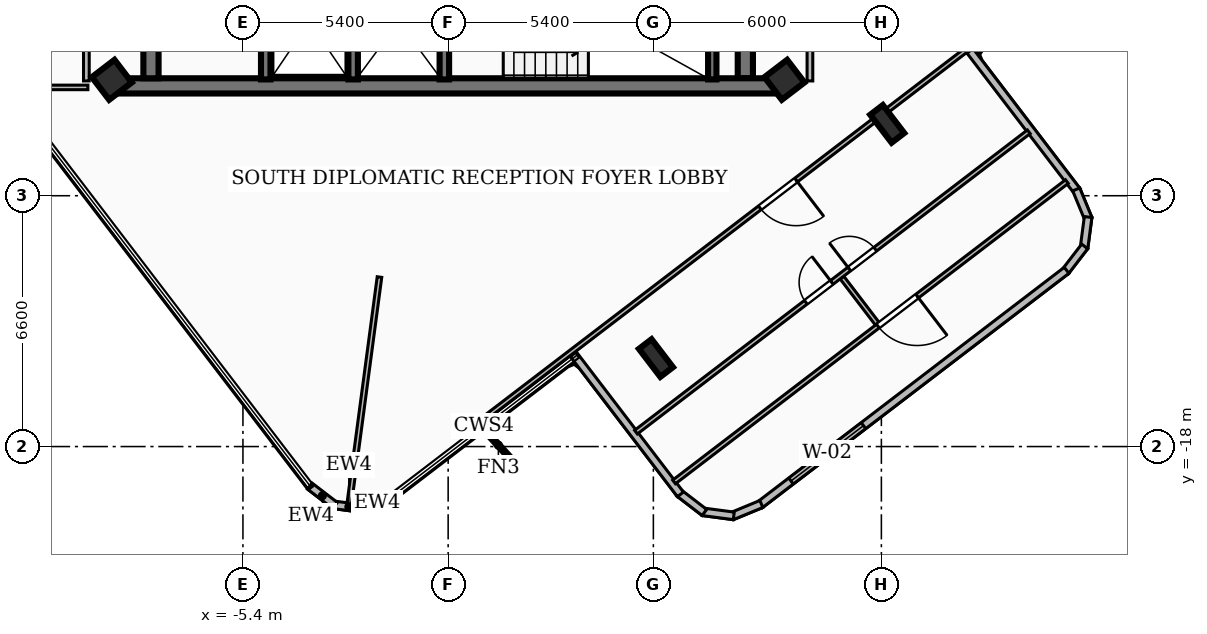
"""IFC4 building model, lengths in metres.
Left out: names, types, materials, properties, quantities, classifications, styles, units other than length and angle.
Written with IfcOpenShell. Run it as: python <this file> out.ifc"""

import sys

from ifc_helpers import new_model, si_unit, direction, frame, frame_2d, origin, origin_2d, place, context, subcontext, project, spatial, rectangle, i_section, extrude, element, fill, save


model = new_model("IFC4")
c1 = context("Model", 3, precision=1e-05, world=origin(), true_north=direction((0.0, 1.0)))
c2 = subcontext(c1, "Body", "Model", "MODEL_VIEW")
j1 = project(units=[si_unit("LENGTHUNIT", "METRE"), si_unit("PLANEANGLEUNIT", "RADIAN")], contexts=[c1])
p1 = place(None, origin())
s1 = spatial("IfcSite", under=j1, at=p1, CompositionType="ELEMENT")
p2 = place(p1, origin())
s2 = spatial("IfcBuilding", under=s1, at=p2, CompositionType="ELEMENT")
p3 = place(p2, frame((0.0, 0.0, 229.14)))
s3 = spatial("IfcBuildingStorey", under=s2, at=p3, CompositionType="ELEMENT", Elevation=229.14)
p4 = place(p3, frame((8.78, -8.51, 0.0), z_axis=(0.0, 0.0, 1.0), x_axis=(-1.0, 0.0, 0.0)))
e1 = element("IfcWall", 1, at=p4, inside=s3, PredefinedType="SHEAR", context=c2, shape_type="SweptSolid", body=[
    extrude(rectangle(XDim=17.56, YDim=0.4, at=frame_2d((8.78, 0.0))), origin(), (0.0, 0.0, 1.0), 3.14),
])
for number, where, z_axis, x_axis in (
    (2, (-7.82, -8.31, 0.0), (0.0, 0.0, 1.0), (0.0, 1.0, 0.0)),
    (3, (7.82, -1.95, 0.0), (0.0, 0.0, 1.0), (0.0, -1.0, 0.0)),
):
    element("IfcWall", number, at=place(p3, frame(where, z_axis=z_axis, x_axis=x_axis)), inside=s3, PredefinedType="SHEAR", context=c2, shape_type="SweptSolid", body=[
        extrude(rectangle(XDim=6.36, YDim=0.4, at=frame_2d((3.18, 0.0))), origin(), (0.0, 0.0, 1.0), 3.14),
    ])
p5 = place(p3, frame((6.95, -8.34, 0.0), z_axis=(0.0, 0.0, 1.0), x_axis=(0.0, 1.0, 0.0)))
e4 = element("IfcWall", 4, at=p5, inside=s3, PredefinedType="SOLIDWALL", context=c2, shape_type="SweptSolid", body=[
    extrude(rectangle(XDim=3.06, YDim=0.22, at=frame_2d((1.53, 0.0))), origin(), (0.0, 0.0, 1.0), 3.14),
])
for number, where, z_axis, x_axis in (
    (5, (-0.1, -8.34, 0.0), (0.0, 0.0, 1.0), (0.0, 1.0, 0.0)),
    (6, (-2.5, -8.34, 0.0), (0.0, 0.0, 1.0), (0.0, 1.0, 0.0)),
    (7, (-4.8, -8.34, 0.0), (0.0, 0.0, 1.0), (0.0, 1.0, 0.0)),
):
    element("IfcWall", number, at=place(p3, frame(where, z_axis=z_axis, x_axis=x_axis)), inside=s3, PredefinedType="SOLIDWALL", context=c2, shape_type="SweptSolid", body=[
        extrude(rectangle(XDim=3.04, YDim=0.25, at=frame_2d((1.52, 0.0))), origin(), (0.0, 0.0, 1.0), 3.14),
    ])
for number, where, z_axis, x_axis in (
    (8, (8.85, -8.35, 0.0), (0.0, 0.0, 1.0), (0.794, 0.607, 0.0)),
    (9, (-8.85, -8.35, 0.0), (0.0, 0.0, 1.0), (0.794, 0.607, 0.0)),
):
    element("IfcColumn", number, at=place(p3, frame(where, z_axis=z_axis, x_axis=x_axis)), inside=s3, PredefinedType="COLUMN", context=c2, shape_type="SweptSolid", body=[
        extrude(rectangle(XDim=0.75, YDim=0.75, at=origin_2d()), origin(), (0.0, 0.0, 1.0), 3.42),
    ])
for number, where, z_axis, x_axis in (
    (10, (5.468, -15.671, 0.0), (0.0, 0.0, 1.0), (0.794, 0.607, 0.0)),
    (11, (11.554, -9.51, 0.0), (0.0, 0.0, 1.0), (0.794, 0.607, 0.0)),
):
    element("IfcColumn", number, at=place(p3, frame(where, z_axis=z_axis, x_axis=x_axis)), inside=s3, PredefinedType="COLUMN", context=c2, shape_type="SweptSolid", body=[
        extrude(i_section(OverallWidth=0.418, OverallDepth=0.927, WebThickness=0.019, FlangeThickness=0.032, at=origin_2d()), origin(), (0.0, 0.0, 1.0), 3.42),
    ])
p6 = place(p3, frame((-1.478, -19.327, 0.0), z_axis=(0.0, 0.0, 1.0), x_axis=(-0.924091394431, -0.382171551451, 0.0)))
e12 = element("IfcWall", 12, at=p6, inside=s3, PredefinedType="SOLIDWALL", context=c2, shape_type="SweptSolid", body=[
    extrude(rectangle(XDim=0.837, YDim=0.2, at=frame_2d((0.419, 0.0))), origin(), (0.0, 0.0, 1.0), 3.14),
])
p7 = place(p3, frame((-2.204, -19.64, 0.0), z_axis=(0.0, 0.0, 1.0), x_axis=(-0.99140789753, 0.130806653943, 0.0)))
e13 = element("IfcWall", 13, at=p7, inside=s3, PredefinedType="SOLIDWALL", context=c2, shape_type="SweptSolid", body=[
    extrude(rectangle(XDim=0.825, YDim=0.2, at=frame_2d((0.413, 0.0))), origin(), (0.0, 0.0, 1.0), 3.14),
])
p8 = place(p3, frame((-2.977, -19.55, 0.0), z_axis=(0.0, 0.0, 1.0), x_axis=(-0.792959338773, 0.609274558022, 0.0)))
e14 = element("IfcWall", 14, at=p8, inside=s3, PredefinedType="SOLIDWALL", context=c2, shape_type="SweptSolid", body=[
    extrude(rectangle(XDim=0.839, YDim=0.2, at=frame_2d((0.419, 0.0))), origin(), (0.0, 0.0, 1.0), 3.14),
])
p9 = place(p3, frame((19.074, -3.607, 0.0), z_axis=(0.0, 0.0, 1.0), x_axis=(-0.794465731546, -0.607308983466, 0.0)))
e15 = element("IfcWall", 15, at=p9, inside=s3, PredefinedType="SOLIDWALL", context=c2, shape_type="SweptSolid", body=[
    extrude(rectangle(XDim=6.743, YDim=0.2, at=frame_2d((3.372, 0.0))), origin(), (0.0, 0.0, 1.0), 3.14),
])
p10 = place(p3, frame((13.732, -7.589, 0.0), z_axis=(0.0, 0.0, 1.0), x_axis=(0.607428636372, -0.794374251669, 0.0)))
e16 = element("IfcWall", 16, at=p10, inside=s3, PredefinedType="SOLIDWALL", context=c2, shape_type="SweptSolid", body=[
    extrude(rectangle(XDim=4.643, YDim=0.2, at=frame_2d((2.321, 0.0))), origin(), (0.0, 0.0, 1.0), 3.14),
])
p11 = place(p3, frame((16.527, -11.234, 0.0), z_axis=(0.0, 0.0, 1.0), x_axis=(0.381408676087, -0.924406524104, 0.0)))
e17 = element("IfcWall", 17, at=p11, inside=s3, PredefinedType="SOLIDWALL", context=c2, shape_type="SweptSolid", body=[
    extrude(rectangle(XDim=0.839, YDim=0.2, at=frame_2d((0.419, 0.0))), origin(), (0.0, 0.0, 1.0), 3.14),
])
p12 = place(p3, frame((16.84, -11.961, 0.0), z_axis=(0.0, 0.0, 1.0), x_axis=(-0.131059066172, -0.991374561492, 0.0)))
e18 = element("IfcWall", 18, at=p12, inside=s3, PredefinedType="SOLIDWALL", context=c2, shape_type="SweptSolid", body=[
    extrude(rectangle(XDim=0.825, YDim=0.2, at=frame_2d((0.413, 0.0))), origin(), (0.0, 0.0, 1.0), 3.14),
])
p13 = place(p3, frame((16.75, -12.734, 0.0), z_axis=(0.0, 0.0, 1.0), x_axis=(-0.609837482774, -0.792526494575, 0.0)))
e19 = element("IfcWall", 19, at=p13, inside=s3, PredefinedType="SOLIDWALL", context=c2, shape_type="SweptSolid", body=[
    extrude(rectangle(XDim=0.838, YDim=0.2, at=frame_2d((0.419, 0.0))), origin(), (0.0, 0.0, 1.0), 3.14),
])
p14 = place(p3, frame((16.274, -13.363, 0.0), z_axis=(0.0, 0.0, 1.0), x_axis=(-0.794458044917, -0.607319038781, 0.0)))
e20 = element("IfcWall", 20, at=p14, inside=s3, PredefinedType="SOLIDWALL", context=c2, shape_type="SweptSolid", body=[
    extrude(rectangle(XDim=10.164, YDim=0.2, at=frame_2d((5.082, 0.0))), origin(), (0.0, 0.0, 1.0), 3.14),
])
p15 = place(p14, frame((6.728, 0.0, 0.85)))
e21 = element("IfcOpeningElement", 21, at=p15, cuts=e20, PredefinedType="OPENING", context=c2, shape_type="SweptSolid", body=[
    extrude(rectangle(XDim=2.4, YDim=2.1, at=frame_2d((1.2, 1.05))), frame((0.0, 0.11, 0.0), z_axis=(0.0, -1.0, 0.0), x_axis=(1.0, 0.0, 0.0)), (0.0, 0.0, 1.0), 0.22),
])
p16 = place(p3, frame((8.242, -19.511, 0.0), z_axis=(0.0, 0.0, 1.0), x_axis=(-0.924091394431, -0.382171551451, 0.0)))
e22 = element("IfcWall", 22, at=p16, inside=s3, PredefinedType="SOLIDWALL", context=c2, shape_type="SweptSolid", body=[
    extrude(rectangle(XDim=0.837, YDim=0.2, at=frame_2d((0.419, 0.0))), origin(), (0.0, 0.0, 1.0), 3.14),
])
p17 = place(p3, frame((7.516, -19.824, 0.0), z_axis=(0.0, 0.0, 1.0), x_axis=(-0.991412958994, 0.130768286444, 0.0)))
e23 = element("IfcWall", 23, at=p17, inside=s3, PredefinedType="SOLIDWALL", context=c2, shape_type="SweptSolid", body=[
    extrude(rectangle(XDim=0.825, YDim=0.2, at=frame_2d((0.413, 0.0))), origin(), (0.0, 0.0, 1.0), 3.14),
])
p18 = place(p3, frame((6.743, -19.734, 0.0), z_axis=(0.0, 0.0, 1.0), x_axis=(-0.792959338773, 0.609274558022, 0.0)))
e24 = element("IfcWall", 24, at=p18, inside=s3, PredefinedType="SOLIDWALL", context=c2, shape_type="SweptSolid", body=[
    extrude(rectangle(XDim=0.839, YDim=0.2, at=frame_2d((0.419, 0.0))), origin(), (0.0, 0.0, 1.0), 3.14),
])
p19 = place(p3, frame((6.113, -19.258, 0.0), z_axis=(0.0, 0.0, 1.0), x_axis=(-0.607327150699, 0.794451843741, 0.0)))
e25 = element("IfcWall", 25, at=p19, inside=s3, PredefinedType="SOLIDWALL", context=c2, shape_type="SweptSolid", body=[
    extrude(rectangle(XDim=4.643, YDim=0.2, at=frame_2d((2.322, 0.0))), origin(), (0.0, 0.0, 1.0), 3.14),
])
for number, where, z_axis, x_axis in (
    (26, (-9.52, -8.38, 0.0), (0.0, 0.0, 1.0), (0.0, 1.0, 0.0)),
    (27, (9.52, -8.38, 0.0), (0.0, 0.0, 1.0), (0.0, 1.0, 0.0)),
):
    element("IfcWall", number, at=place(p3, frame(where, z_axis=z_axis, x_axis=x_axis)), inside=s3, PredefinedType="PARTITIONING", context=c2, shape_type="SweptSolid", body=[
        extrude(rectangle(XDim=6.63, YDim=0.15, at=frame_2d((3.315, 0.0))), origin(), (0.0, 0.0, 1.0), 3.14),
    ])
p20 = place(p3, frame((-11.571, -8.55, 0.0), z_axis=(0.0, 0.0, 1.0), x_axis=(1.0, 0.0, 0.0)))
e28 = element("IfcWall", 28, at=p20, inside=s3, PredefinedType="PARTITIONING", context=c2, shape_type="SweptSolid", body=[
    extrude(rectangle(XDim=2.091, YDim=0.12, at=frame_2d((1.045, 0.0))), origin(), (0.0, 0.0, 1.0), 3.14),
])
p21 = place(p3, frame((-1.807, -13.54, 0.0), z_axis=(0.0, 0.0, 1.0), x_axis=(-0.132245865303, -0.991216944523, 0.0)))
e29 = element("IfcWall", 29, at=p21, inside=s3, PredefinedType="PARTITIONING", context=c2, shape_type="SweptSolid", body=[
    extrude(rectangle(XDim=6.035, YDim=0.12, at=frame_2d((3.018, 0.0))), origin(), (0.0, 0.0, 1.0), 3.14),
])
p22 = place(p3, frame((17.068, -4.939, 0.0), z_axis=(0.0, 0.0, 1.0), x_axis=(-0.794433927634, -0.607350586255, 0.0)))
e30 = element("IfcWall", 30, at=p22, inside=s3, PredefinedType="PARTITIONING", context=c2, shape_type="SweptSolid", body=[
    extrude(rectangle(XDim=20.58, YDim=0.12, at=frame_2d((10.29, 0.0))), origin(), (0.0, 0.0, 1.0), 2.51),
])
p23 = place(p22, frame((9.96, 0.0, 0.0)))
e31 = element("IfcOpeningElement", 31, at=p23, cuts=e30, PredefinedType="OPENING", context=c2, shape_type="SweptSolid", body=[
    extrude(rectangle(XDim=1.2, YDim=2.1, at=frame_2d((0.6, 1.05))), frame((0.0, 0.07, 0.0), z_axis=(0.0, -1.0, 0.0), x_axis=(1.0, 0.0, 0.0)), (0.0, 0.0, 1.0), 0.14),
])
p24 = place(p3, frame((10.362, -13.553, 0.0), z_axis=(0.0, 0.0, 1.0), x_axis=(0.6073553069, -0.794430318644, 0.0)))
e32 = element("IfcWall", 32, at=p24, inside=s3, PredefinedType="PARTITIONING", context=c2, shape_type="SweptSolid", body=[
    extrude(rectangle(XDim=1.53, YDim=0.12, at=frame_2d((0.765, 0.0))), origin(), (0.0, 0.0, 1.0), 3.14),
])
p25 = place(p3, frame((4.943, -17.62, 0.0), z_axis=(0.0, 0.0, 1.0), x_axis=(0.79442653656, 0.607360253893, 0.0)))
e33 = element("IfcWall", 33, at=p25, inside=s3, PredefinedType="PARTITIONING", context=c2, shape_type="SweptSolid", body=[
    extrude(rectangle(XDim=13.01, YDim=0.12, at=frame_2d((6.505, 0.0))), origin(), (0.0, 0.0, 1.0), 3.14),
])
p26 = place(p25, frame((5.625, 0.0, 0.0)))
e34 = element("IfcOpeningElement", 34, at=p26, cuts=e33, PredefinedType="OPENING", context=c2, shape_type="SweptSolid", body=[
    extrude(rectangle(XDim=0.86, YDim=2.04, at=frame_2d((0.43, 1.02))), frame((0.0, 0.07, 0.0), z_axis=(0.0, -1.0, 0.0), x_axis=(1.0, 0.0, 0.0)), (0.0, 0.0, 1.0), 0.14),
])
p27 = place(p25, frame((7.065, 0.0, 0.0)))
e35 = element("IfcOpeningElement", 35, at=p27, cuts=e33, PredefinedType="OPENING", context=c2, shape_type="SweptSolid", body=[
    extrude(rectangle(XDim=0.86, YDim=2.04, at=frame_2d((0.43, 1.02))), frame((0.0, 0.07, 0.0), z_axis=(0.0, -1.0, 0.0), x_axis=(1.0, 0.0, 0.0)), (0.0, 0.0, 1.0), 0.14),
])
p28 = place(p3, frame((16.281, -11.029, 0.0), z_axis=(0.0, 0.0, 1.0), x_axis=(-0.794435590649, -0.607348410973, 0.0)))
e36 = element("IfcWall", 36, at=p28, inside=s3, PredefinedType="PARTITIONING", context=c2, shape_type="SweptSolid", body=[
    extrude(rectangle(XDim=13.01, YDim=0.12, at=frame_2d((6.505, 0.0))), origin(), (0.0, 0.0, 1.0), 3.14),
])
p29 = place(p28, frame((4.96, 0.0, 0.0)))
e37 = element("IfcOpeningElement", 37, at=p29, cuts=e36, PredefinedType="OPENING", context=c2, shape_type="SweptSolid", body=[
    extrude(rectangle(XDim=1.3, YDim=2.1, at=frame_2d((0.65, 1.05))), frame((0.0, 0.07, 0.0), z_axis=(0.0, -1.0, 0.0), x_axis=(1.0, 0.0, 0.0)), (0.0, 0.0, 1.0), 0.14),
])
p30 = place(p15, origin())
e38 = element("IfcWindow", 38, at=p30, inside=s3, PartitioningType="SINGLE_PANEL", PredefinedType="WINDOW", context=c2, shape_type="SweptSolid", body=[
    extrude(rectangle(XDim=2.4, YDim=2.1, at=frame_2d((1.2, 1.05))), frame((0.0, 0.03, 0.0), z_axis=(0.0, -1.0, 0.0), x_axis=(1.0, 0.0, 0.0)), (0.0, 0.0, 1.0), 0.06),
])
fill(e21, e38)
p31 = place(p23, origin())
e39 = element("IfcDoor", 39, at=p31, inside=s3, OperationType="SINGLE_SWING_LEFT", PredefinedType="DOOR", context=c2, shape_type="SweptSolid", body=[
    extrude(rectangle(XDim=1.2, YDim=2.1, at=frame_2d((0.6, 1.05))), frame((0.0, 0.025, 0.0), z_axis=(0.0, -1.0, 0.0), x_axis=(1.0, 0.0, 0.0)), (0.0, 0.0, 1.0), 0.05),
])
fill(e31, e39)
p32 = place(p26, origin())
e40 = element("IfcDoor", 40, at=p32, inside=s3, OperationType="SINGLE_SWING_RIGHT", PredefinedType="DOOR", context=c2, shape_type="SweptSolid", body=[
    extrude(rectangle(XDim=0.86, YDim=2.04, at=frame_2d((0.43, 1.02))), frame((0.0, 0.025, 0.0), z_axis=(0.0, -1.0, 0.0), x_axis=(1.0, 0.0, 0.0)), (0.0, 0.0, 1.0), 0.05),
])
fill(e34, e40)
p33 = place(p27, origin())
e41 = element("IfcDoor", 41, at=p33, inside=s3, OperationType="SINGLE_SWING_LEFT", PredefinedType="DOOR", context=c2, shape_type="SweptSolid", body=[
    extrude(rectangle(XDim=0.86, YDim=2.04, at=frame_2d((0.43, 1.02))), frame((0.0, 0.025, 0.0), z_axis=(0.0, -1.0, 0.0), x_axis=(1.0, 0.0, 0.0)), (0.0, 0.0, 1.0), 0.05),
])
fill(e35, e41)
p34 = place(p29, origin())
e42 = element("IfcDoor", 42, at=p34, inside=s3, OperationType="SINGLE_SWING_LEFT", PredefinedType="DOOR", context=c2, shape_type="SweptSolid", body=[
    extrude(rectangle(XDim=1.3, YDim=2.1, at=frame_2d((0.65, 1.05))), frame((0.0, 0.025, 0.0), z_axis=(0.0, -1.0, 0.0), x_axis=(1.0, 0.0, 0.0)), (0.0, 0.0, 1.0), 0.05),
])
fill(e37, e42)
save(model, sys.argv[1])
